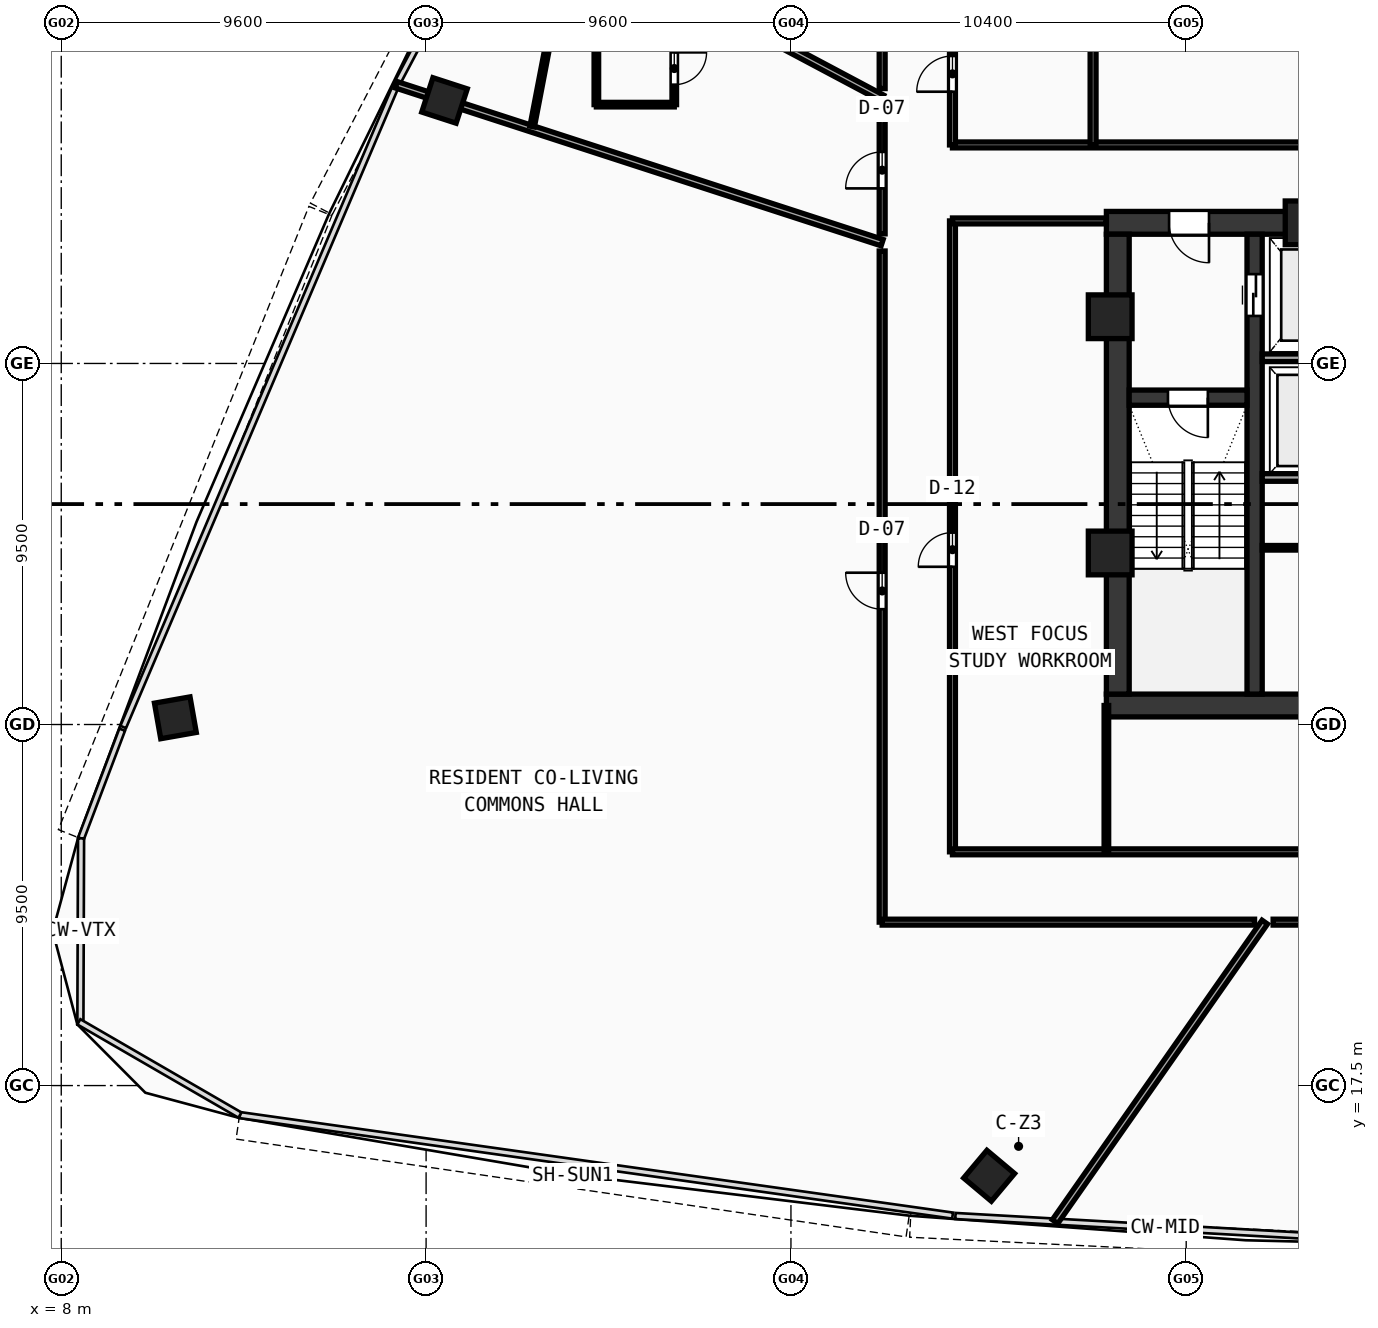
"""IFC4 building model, lengths in metres.
Left out: names, types, materials, properties, quantities, classifications, styles, units other than length and angle.
Written with IfcOpenShell. Run it as: python <this file> out.ifc"""

import sys

from ifc_helpers import new_model, si_unit, direction, frame, frame_2d, origin, origin_with_axes, origin_2d, place, context, subcontext, project, spatial, rectangle, hollow_rectangle, extrude, source, transform, mapped, element, fill, save


model = new_model("IFC4")
c1 = context("Model", 3, precision=1e-05, world=origin(), true_north=direction((0.0, 1.0)))
c2 = subcontext(c1, "Body", "Model", "MODEL_VIEW")
j1 = project(units=[si_unit("LENGTHUNIT", "METRE"), si_unit("PLANEANGLEUNIT", "RADIAN")], contexts=[c1])
p1 = place(None, origin())
s1 = spatial("IfcSite", under=j1, at=p1, CompositionType="ELEMENT")
p2 = place(p1, origin())
s2 = spatial("IfcBuilding", under=s1, at=p2, CompositionType="ELEMENT")
p3 = place(p2, frame((0.0, 0.0, 151.91)))
s3 = spatial("IfcBuildingStorey", under=s2, at=p3, CompositionType="ELEMENT", Elevation=151.91)
p4 = place(p3, frame((35.5, 27.5, 0.0), z_axis=(0.0, 0.0, 1.0), x_axis=(1.0, 0.0, 0.0)))
e1 = element("IfcWall", 1, at=p4, inside=s3, PredefinedType="SHEAR", context=c2, shape_type="SweptSolid", body=[
    extrude(rectangle(XDim=25.0, YDim=0.6, at=frame_2d((12.5, 0.0))), origin(), (0.0, 0.0, 1.0), 3.42),
])
p5 = place(p3, frame((35.5, 40.2, 0.0), z_axis=(0.0, 0.0, 1.0), x_axis=(1.0, 0.0, 0.0)))
e2 = element("IfcWall", 2, at=p5, inside=s3, PredefinedType="SHEAR", context=c2, shape_type="SweptSolid", body=[
    extrude(rectangle(XDim=11.3, YDim=0.6, at=frame_2d((5.65, 0.0))), origin(), (0.0, 0.0, 1.0), 3.42),
])
p6 = place(p5, frame((1.65, 0.0, 0.0)))
e3 = element("IfcOpeningElement", 3, at=p6, cuts=e2, PredefinedType="OPENING", context=c2, shape_type="SweptSolid", body=[
    extrude(rectangle(XDim=1.05, YDim=2.1, at=frame_2d((0.525, 1.05))), frame((0.0, 0.31, 0.0), z_axis=(0.0, -1.0, 0.0), x_axis=(1.0, 0.0, 0.0)), (0.0, 0.0, 1.0), 0.62),
])
p7 = place(p3, frame((35.8, 27.8, 0.0), z_axis=(0.0, 0.0, 1.0), x_axis=(0.0, 1.0, 0.0)))
e4 = element("IfcWall", 4, at=p7, inside=s3, PredefinedType="SHEAR", context=c2, shape_type="SweptSolid", body=[
    extrude(rectangle(XDim=12.1, YDim=0.6, at=frame_2d((6.05, 0.0))), origin(), (0.0, 0.0, 1.0), 3.42),
])
p8 = place(p3, frame((39.4, 27.8, 0.0), z_axis=(0.0, 0.0, 1.0), x_axis=(0.0, 1.0, 0.0)))
e5 = element("IfcWall", 5, at=p8, inside=s3, PredefinedType="SHEAR", context=c2, shape_type="SweptSolid", body=[
    extrude(rectangle(XDim=12.1, YDim=0.4, at=frame_2d((6.05, 0.0))), origin(), (0.0, 0.0, 1.0), 3.42),
])
p9 = place(p8, frame((9.95, 0.0, 0.0)))
e6 = element("IfcOpeningElement", 6, at=p9, cuts=e5, PredefinedType="OPENING", context=c2, shape_type="SweptSolid", body=[
    extrude(rectangle(XDim=1.1, YDim=2.1, at=frame_2d((0.55, 1.05))), frame((0.0, 0.21, 0.0), z_axis=(0.0, -1.0, 0.0), x_axis=(1.0, 0.0, 0.0)), (0.0, 0.0, 1.0), 0.42),
])
p10 = place(p3, frame((36.1, 35.6, 0.0), z_axis=(0.0, 0.0, 1.0), x_axis=(1.0, 0.0, 0.0)))
e7 = element("IfcWall", 7, at=p10, inside=s3, PredefinedType="SHEAR", context=c2, shape_type="SweptSolid", body=[
    extrude(rectangle(XDim=3.1, YDim=0.4, at=frame_2d((1.55, 0.0))), origin(), (0.0, 0.0, 1.0), 3.42),
])
p11 = place(p10, frame((1.02, 0.0, 0.0)))
e8 = element("IfcOpeningElement", 8, at=p11, cuts=e7, PredefinedType="OPENING", context=c2, shape_type="SweptSolid", body=[
    extrude(rectangle(XDim=1.05, YDim=2.1, at=frame_2d((0.525, 1.05))), frame((0.0, 0.21, 0.0), z_axis=(0.0, -1.0, 0.0), x_axis=(1.0, 0.0, 0.0)), (0.0, 0.0, 1.0), 0.42),
])
m1 = source(origin(), c2, "Body", "SweptSolid", [
    extrude(hollow_rectangle(XDim=1.15, YDim=1.15, WallThickness=0.048, at=origin_2d()), origin(), (0.0, 0.0, 1.0), 3.68),
])
for number, where, z_axis, x_axis in (
    (9, (40.781, 40.2, -0.26), (0.0, 0.0, 1.0), (1.0, 0.0, 0.0)),
    (10, (35.6, 37.729, -0.26), (0.0, 0.0, 1.0), (1.0, 0.0, 0.0)),
    (11, (35.6, 31.513, -0.26), (0.0, 0.0, 1.0), (1.0, 0.0, 0.0)),
):
    element("IfcColumn", number, at=place(p3, frame(where, z_axis=z_axis, x_axis=x_axis)), inside=s3, PredefinedType="COLUMN", context=c2, shape_type="MappedRepresentation", body=[
        mapped(m1, transform((0.0, 0.0, 0.0), scale=1.0)),
    ])
m2 = source(origin(), c2, "Body", "SweptSolid", [
    extrude(hollow_rectangle(XDim=0.95, YDim=0.95, WallThickness=0.04, at=origin_2d()), origin(), (0.0, 0.0, 1.0), 3.68),
])
for number, where, z_axis, x_axis in (
    (12, (32.415, 15.126, -0.26), (0.0, 0.0, 1.0), (0.766, -0.643, 0.0)),
    (13, (18.085, 43.42, -0.26), (0.0, 0.0, 1.0), (-0.309, -0.951, 0.0)),
    (14, (11.003, 27.177, -0.26), (0.0, 0.0, 1.0), (0.174, -0.985, 0.0)),
):
    element("IfcColumn", number, at=place(p3, frame(where, z_axis=z_axis, x_axis=x_axis)), inside=s3, PredefinedType="COLUMN", context=c2, shape_type="MappedRepresentation", body=[
        mapped(m2, transform((0.0, 0.0, 0.0), scale=1.0)),
    ])
for number, where, z_axis, x_axis in (
    (15, (39.6, 36.65, 0.0), (0.0, 0.0, 1.0), (1.0, 0.0, 0.0)),
    (16, (39.6, 33.5, 0.0), (0.0, 0.0, 1.0), (1.0, 0.0, 0.0)),
):
    element("IfcWall", number, at=place(p3, frame(where, z_axis=z_axis, x_axis=x_axis)), inside=s3, PredefinedType="SOLIDWALL", context=c2, shape_type="SweptSolid", body=[
        extrude(rectangle(XDim=2.72, YDim=0.2, at=frame_2d((1.36, 0.0))), origin(), (0.0, 0.0, 1.0), 3.42),
    ])
p12 = place(p3, frame((39.6, 31.65, 0.0), z_axis=(0.0, 0.0, 1.0), x_axis=(1.0, 0.0, 0.0)))
e17 = element("IfcWall", 17, at=p12, inside=s3, PredefinedType="PARTITIONING", context=c2, shape_type="SweptSolid", body=[
    extrude(rectangle(XDim=2.72, YDim=0.12, at=frame_2d((1.36, 0.0))), origin(), (0.0, 0.0, 1.0), 3.42),
])
p13 = place(p3, frame((31.45, 42.25, 0.0), z_axis=(0.0, 0.0, 1.0), x_axis=(1.0, 0.0, 0.0)))
e18 = element("IfcWall", 18, at=p13, inside=s3, PredefinedType="PARTITIONING", context=c2, shape_type="SweptSolid", body=[
    extrude(rectangle(XDim=33.1, YDim=0.155, at=frame_2d((16.55, 0.0))), origin(), (0.0, 0.0, 1.0), 2.77),
])
p14 = place(p3, frame((31.45, 42.25, 0.0), z_axis=(0.0, 0.0, 1.0), x_axis=(0.0, 1.0, 0.0)))
e19 = element("IfcWall", 19, at=p14, inside=s3, PredefinedType="PARTITIONING", context=c2, shape_type="SweptSolid", body=[
    extrude(rectangle(XDim=11.7, YDim=0.155, at=frame_2d((5.85, 0.0))), origin(), (0.0, 0.0, 1.0), 2.77),
])
p15 = place(p14, frame((1.4, 0.0, 0.0)))
e20 = element("IfcOpeningElement", 20, at=p15, cuts=e19, PredefinedType="OPENING", context=c2, shape_type="SweptSolid", body=[
    extrude(rectangle(XDim=0.94, YDim=2.1, at=frame_2d((0.47, 1.05))), frame((0.0, 0.087, 0.0), z_axis=(0.0, -1.0, 0.0), x_axis=(1.0, 0.0, 0.0)), (0.0, 0.0, 1.0), 0.175),
])
p16 = place(p14, frame((6.8, 0.0, 0.0)))
e21 = element("IfcOpeningElement", 21, at=p16, cuts=e19, PredefinedType="OPENING", context=c2, shape_type="SweptSolid", body=[
    extrude(rectangle(XDim=0.92, YDim=2.1, at=frame_2d((0.46, 1.05))), frame((0.0, 0.087, 0.0), z_axis=(0.0, -1.0, 0.0), x_axis=(1.0, 0.0, 0.0)), (0.0, 0.0, 1.0), 0.175),
])
p17 = place(p3, frame((35.15, 42.25, 0.0), z_axis=(0.0, 0.0, 1.0), x_axis=(0.0, 1.0, 0.0)))
e22 = element("IfcWall", 22, at=p17, inside=s3, PredefinedType="PARTITIONING", context=c2, shape_type="SweptSolid", body=[
    extrude(rectangle(XDim=11.7, YDim=0.155, at=frame_2d((5.85, 0.0))), origin(), (0.0, 0.0, 1.0), 2.77),
])
p18 = place(p3, frame((31.45, 23.65, 0.0), z_axis=(0.0, 0.0, 1.0), x_axis=(0.0, 1.0, 0.0)))
e23 = element("IfcWall", 23, at=p18, inside=s3, PredefinedType="PARTITIONING", context=c2, shape_type="SweptSolid", body=[
    extrude(rectangle(XDim=16.6, YDim=0.155, at=frame_2d((8.3, 0.0))), origin(), (0.0, 0.0, 1.0), 2.77),
])
p19 = place(p18, frame((7.5, 0.0, 0.0)))
e24 = element("IfcOpeningElement", 24, at=p19, cuts=e23, PredefinedType="OPENING", context=c2, shape_type="SweptSolid", body=[
    extrude(rectangle(XDim=0.9, YDim=2.08, at=frame_2d((0.45, 1.04))), frame((0.0, 0.087, 0.0), z_axis=(0.0, -1.0, 0.0), x_axis=(1.0, 0.0, 0.0)), (0.0, 0.0, 1.0), 0.175),
])
p20 = place(p3, frame((31.45, 23.65, 0.0), z_axis=(0.0, 0.0, 1.0), x_axis=(1.0, 0.0, 0.0)))
e25 = element("IfcWall", 25, at=p20, inside=s3, PredefinedType="PARTITIONING", context=c2, shape_type="SweptSolid", body=[
    extrude(rectangle(XDim=33.1, YDim=0.155, at=frame_2d((16.55, 0.0))), origin(), (0.0, 0.0, 1.0), 2.77),
])
p21 = place(p20, frame((16.0, 0.0, 0.0)))
e26 = element("IfcOpeningElement", 26, at=p21, cuts=e25, PredefinedType="OPENING", context=c2, shape_type="SweptSolid", body=[
    extrude(rectangle(XDim=0.92, YDim=2.1, at=frame_2d((0.46, 1.05))), frame((0.0, 0.087, 0.0), z_axis=(0.0, -1.0, 0.0), x_axis=(1.0, 0.0, 0.0)), (0.0, 0.0, 1.0), 0.175),
])
p22 = place(p3, frame((31.45, 40.25, 0.0), z_axis=(0.0, 0.0, 1.0), x_axis=(1.0, 0.0, 0.0)))
e27 = element("IfcWall", 27, at=p22, inside=s3, PredefinedType="PARTITIONING", context=c2, shape_type="SweptSolid", body=[
    extrude(rectangle(XDim=4.05, YDim=0.155, at=frame_2d((2.025, 0.0))), origin(), (0.0, 0.0, 1.0), 3.42),
])
p23 = place(p3, frame((35.5, 23.65, 0.0), z_axis=(0.0, 0.0, 1.0), x_axis=(0.0, 1.0, 0.0)))
e28 = element("IfcWall", 28, at=p23, inside=s3, PredefinedType="PARTITIONING", context=c2, shape_type="SweptSolid", body=[
    extrude(rectangle(XDim=3.85, YDim=0.12, at=frame_2d((1.925, 0.0))), origin(), (0.0, 0.0, 1.0), 3.02),
])
p24 = place(p3, frame((29.6, 43.483, 0.0), z_axis=(0.0, 0.0, 1.0), x_axis=(-0.882944706502, 0.469476991193, 0.0)))
e29 = element("IfcWall", 29, at=p24, inside=s3, PredefinedType="PARTITIONING", context=c2, shape_type="SweptSolid", body=[
    extrude(rectangle(XDim=11.464, YDim=0.175, at=frame_2d((5.732, 0.0))), origin(), (0.0, 0.0, 1.0), 2.77),
])
p25 = place(p3, frame((29.6, 39.678, 0.0), z_axis=(0.0, 0.0, 1.0), x_axis=(-0.951059027278, 0.309009266259, 0.0)))
e30 = element("IfcWall", 30, at=p25, inside=s3, PredefinedType="PARTITIONING", context=c2, shape_type="SweptSolid", body=[
    extrude(rectangle(XDim=13.441, YDim=0.175, at=frame_2d((6.72, 0.0))), origin(), (0.0, 0.0, 1.0), 2.77),
])
p26 = place(p3, frame((39.667, 21.8, 0.0), z_axis=(0.0, 0.0, 1.0), x_axis=(-0.573578164834, -0.81915083399, 0.0)))
e31 = element("IfcWall", 31, at=p26, inside=s3, PredefinedType="PARTITIONING", context=c2, shape_type="SweptSolid", body=[
    extrude(rectangle(XDim=9.62, YDim=0.175, at=frame_2d((4.81, 0.0))), origin(), (0.0, 0.0, 1.0), 2.77),
])
p27 = place(p3, frame((29.6, 21.8, 0.0), z_axis=(0.0, 0.0, 1.0), x_axis=(0.0, 1.0, 0.0)))
e32 = element("IfcWall", 32, at=p27, inside=s3, PredefinedType="PARTITIONING", context=c2, shape_type="SweptSolid", body=[
    extrude(rectangle(XDim=17.659, YDim=0.155, at=frame_2d((8.829, 0.0))), origin(), (0.0, 0.0, 1.0), 2.77),
])
p28 = place(p27, frame((8.234, 0.0, 0.0)))
e33 = element("IfcOpeningElement", 33, at=p28, cuts=e32, PredefinedType="OPENING", context=c2, shape_type="SweptSolid", body=[
    extrude(rectangle(XDim=0.96, YDim=2.12, at=frame_2d((0.48, 1.06))), frame((0.0, 0.087, 0.0), z_axis=(0.0, -1.0, 0.0), x_axis=(1.0, 0.0, 0.0)), (0.0, 0.0, 1.0), 0.175),
])
p29 = place(p3, frame((29.6, 39.91, 0.0), z_axis=(0.0, 0.0, 1.0), x_axis=(0.0, 1.0, 0.0)))
e34 = element("IfcWall", 34, at=p29, inside=s3, PredefinedType="PARTITIONING", context=c2, shape_type="SweptSolid", body=[
    extrude(rectangle(XDim=3.354, YDim=0.155, at=frame_2d((1.677, 0.0))), origin(), (0.0, 0.0, 1.0), 3.02),
])
p30 = place(p29, frame((1.196, 0.0, 0.0)))
e35 = element("IfcOpeningElement", 35, at=p30, cuts=e34, PredefinedType="OPENING", context=c2, shape_type="SweptSolid", body=[
    extrude(rectangle(XDim=0.96, YDim=2.12, at=frame_2d((0.48, 1.06))), frame((0.0, 0.087, 0.0), z_axis=(0.0, -1.0, 0.0), x_axis=(1.0, 0.0, 0.0)), (0.0, 0.0, 1.0), 0.175),
])
p31 = place(p3, frame((29.6, 43.733, 0.0), z_axis=(0.0, 0.0, 1.0), x_axis=(0.0, 1.0, 0.0)))
e36 = element("IfcWall", 36, at=p31, inside=s3, PredefinedType="PARTITIONING", context=c2, shape_type="SweptSolid", body=[
    extrude(rectangle(XDim=6.315, YDim=0.155, at=frame_2d((3.157, 0.0))), origin(), (0.0, 0.0, 1.0), 2.77),
])
p32 = place(p31, frame((2.683, 0.0, 0.0)))
e37 = element("IfcOpeningElement", 37, at=p32, cuts=e36, PredefinedType="OPENING", context=c2, shape_type="SweptSolid", body=[
    extrude(rectangle(XDim=0.92, YDim=2.1, at=frame_2d((0.46, 1.05))), frame((0.0, 0.087, 0.0), z_axis=(0.0, -1.0, 0.0), x_axis=(1.0, 0.0, 0.0)), (0.0, 0.0, 1.0), 0.175),
])
p33 = place(p3, frame((44.583, 21.8, 0.0), z_axis=(0.0, 0.0, 1.0), x_axis=(-1.0, 0.0, 0.0)))
e38 = element("IfcWall", 38, at=p33, inside=s3, PredefinedType="PARTITIONING", context=c2, shape_type="SweptSolid", body=[
    extrude(rectangle(XDim=4.696, YDim=0.155, at=frame_2d((2.348, 0.0))), origin(), (0.0, 0.0, 1.0), 3.42),
])
p34 = place(p33, frame((1.869, 0.0, 0.0)))
e39 = element("IfcOpeningElement", 39, at=p34, cuts=e38, PredefinedType="OPENING", context=c2, shape_type="SweptSolid", body=[
    extrude(rectangle(XDim=0.96, YDim=2.12, at=frame_2d((0.48, 1.06))), frame((0.0, 0.087, 0.0), z_axis=(0.0, -1.0, 0.0), x_axis=(1.0, 0.0, 0.0)), (0.0, 0.0, 1.0), 0.175),
])
p35 = place(p3, frame((39.399, 21.8, 0.0), z_axis=(0.0, 0.0, 1.0), x_axis=(-1.0, 0.0, 0.0)))
e40 = element("IfcWall", 40, at=p35, inside=s3, PredefinedType="PARTITIONING", context=c2, shape_type="SweptSolid", body=[
    extrude(rectangle(XDim=9.799, YDim=0.155, at=frame_2d((4.899, 0.0))), origin(), (0.0, 0.0, 1.0), 2.77),
])
p36 = place(p3, frame((22.08, 43.31, 0.0), z_axis=(0.0, 0.0, 1.0), x_axis=(1.0, 0.0, 0.0)))
e41 = element("IfcWall", 41, at=p36, inside=s3, PredefinedType="PARTITIONING", context=c2, shape_type="SweptSolid", body=[
    extrude(rectangle(XDim=2.05, YDim=0.12, at=frame_2d((1.025, 0.0))), origin(), (0.0, 0.0, 1.0), 3.42),
])
p37 = place(p3, frame((24.13, 43.31, 0.0), z_axis=(0.0, 0.0, 1.0), x_axis=(0.0, 1.0, 0.0)))
e42 = element("IfcWall", 42, at=p37, inside=s3, PredefinedType="PARTITIONING", context=c2, shape_type="SweptSolid", body=[
    extrude(rectangle(XDim=1.9, YDim=0.12, at=frame_2d((0.95, 0.0))), origin(), (0.0, 0.0, 1.0), 3.42),
])
p38 = place(p37, frame((0.525, 0.0, 0.0)))
e43 = element("IfcOpeningElement", 43, at=p38, cuts=e42, PredefinedType="OPENING", context=c2, shape_type="SweptSolid", body=[
    extrude(rectangle(XDim=0.85, YDim=2.1, at=frame_2d((0.425, 1.05))), frame((0.0, 0.07, 0.0), z_axis=(0.0, -1.0, 0.0), x_axis=(1.0, 0.0, 0.0)), (0.0, 0.0, 1.0), 0.14),
])
p39 = place(p3, frame((22.08, 45.21, 0.0), z_axis=(0.0, 0.0, 1.0), x_axis=(0.0, -1.0, 0.0)))
e44 = element("IfcWall", 44, at=p39, inside=s3, PredefinedType="PARTITIONING", context=c2, shape_type="SweptSolid", body=[
    extrude(rectangle(XDim=1.9, YDim=0.12, at=frame_2d((0.95, 0.0))), origin(), (0.0, 0.0, 1.0), 3.42),
])
p40 = place(p3, frame((21.364, 47.795, 0.0), z_axis=(0.0, 0.0, 1.0), x_axis=(-0.188731428073, -0.982028740953, 0.0)))
e45 = element("IfcWall", 45, at=p40, inside=s3, PredefinedType="PARTITIONING", context=c2, shape_type="SweptSolid", body=[
    extrude(rectangle(XDim=5.154, YDim=0.12, at=frame_2d((2.577, 0.0))), origin(), (0.0, 0.0, 1.0), 2.77),
])
p41 = place(p40, frame((2.117, 0.0, 0.0)))
e46 = element("IfcOpeningElement", 46, at=p41, cuts=e45, PredefinedType="OPENING", context=c2, shape_type="SweptSolid", body=[
    extrude(rectangle(XDim=0.92, YDim=2.1, at=frame_2d((0.46, 1.05))), frame((0.0, 0.07, 0.0), z_axis=(0.0, -1.0, 0.0), x_axis=(1.0, 0.0, 0.0)), (0.0, 0.0, 1.0), 0.14),
])
m3 = source(origin(), c2, "Body", "SweptSolid", [
    extrude(rectangle(XDim=1.05, YDim=2.1, at=frame_2d((0.525, 1.05))), frame((0.0, 0.025, 0.0), z_axis=(0.0, -1.0, 0.0), x_axis=(1.0, 0.0, 0.0)), (0.0, 0.0, 1.0), 0.05),
])
p42 = place(p11, frame((1.05, 0.0, 0.0), z_axis=(0.0, 0.0, 1.0), x_axis=(-1.0, 0.0, 0.0)))
e47 = element("IfcDoor", 47, at=p42, inside=s3, OperationType="SINGLE_SWING_LEFT", PredefinedType="DOOR", context=c2, shape_type="MappedRepresentation", body=[
    mapped(m3, transform((0.0, 0.0, 0.0), scale=1.0)),
])
fill(e8, e47)
p43 = place(p6, frame((1.05, 0.0, 0.0), z_axis=(0.0, 0.0, 1.0), x_axis=(-1.0, 0.0, 0.0)))
e48 = element("IfcDoor", 48, at=p43, inside=s3, OperationType="SINGLE_SWING_LEFT", PredefinedType="DOOR", context=c2, shape_type="MappedRepresentation", body=[
    mapped(m3, transform((0.0, 0.0, 0.0), scale=1.0)),
])
fill(e3, e48)
m4 = source(origin(), c2, "Body", "SweptSolid", [
    extrude(rectangle(XDim=1.1, YDim=2.1, at=frame_2d((0.55, 1.05))), frame((0.0, 0.025, 0.0), z_axis=(0.0, -1.0, 0.0), x_axis=(1.0, 0.0, 0.0)), (0.0, 0.0, 1.0), 0.05),
])
p44 = place(p9, frame((1.1, 0.0, 0.0), z_axis=(0.0, 0.0, 1.0), x_axis=(-1.0, 0.0, 0.0)))
e49 = element("IfcDoor", 49, at=p44, inside=s3, OperationType="DOUBLE_DOOR_SLIDING", PredefinedType="DOOR", context=c2, shape_type="MappedRepresentation", body=[
    mapped(m4, transform((0.0, 0.0, 0.0), scale=1.0)),
])
fill(e6, e49)
m5 = source(origin(), c2, "Body", "SweptSolid", [
    extrude(rectangle(XDim=0.94, YDim=2.1, at=frame_2d((0.47, 1.05))), frame((0.0, 0.025, 0.0), z_axis=(0.0, -1.0, 0.0), x_axis=(1.0, 0.0, 0.0)), (0.0, 0.0, 1.0), 0.05),
])
p45 = place(p15, origin_with_axes())
e50 = element("IfcDoor", 50, at=p45, inside=s3, OperationType="SINGLE_SWING_LEFT", PredefinedType="DOOR", context=c2, shape_type="MappedRepresentation", body=[
    mapped(m5, transform((0.0, 0.0, 0.0), scale=1.0)),
])
fill(e20, e50)
m6 = source(origin(), c2, "Body", "SweptSolid", [
    extrude(rectangle(XDim=0.9, YDim=2.08, at=frame_2d((0.45, 1.04))), frame((0.0, 0.025, 0.0), z_axis=(0.0, -1.0, 0.0), x_axis=(1.0, 0.0, 0.0)), (0.0, 0.0, 1.0), 0.05),
])
p46 = place(p19, origin_with_axes())
e51 = element("IfcDoor", 51, at=p46, inside=s3, OperationType="SINGLE_SWING_LEFT", PredefinedType="DOOR", context=c2, shape_type="MappedRepresentation", body=[
    mapped(m6, transform((0.0, 0.0, 0.0), scale=1.0)),
])
fill(e24, e51)
m7 = source(origin(), c2, "Body", "SweptSolid", [
    extrude(rectangle(XDim=0.96, YDim=2.12, at=frame_2d((0.48, 1.06))), frame((0.0, 0.025, 0.0), z_axis=(0.0, -1.0, 0.0), x_axis=(1.0, 0.0, 0.0)), (0.0, 0.0, 1.0), 0.05),
])
p47 = place(p30, origin_with_axes())
e52 = element("IfcDoor", 52, at=p47, inside=s3, OperationType="SINGLE_SWING_LEFT", PredefinedType="DOOR", context=c2, shape_type="MappedRepresentation", body=[
    mapped(m7, transform((0.0, 0.0, 0.0), scale=1.0)),
])
fill(e35, e52)
m8 = source(origin(), c2, "Body", "SweptSolid", [
    extrude(rectangle(XDim=0.85, YDim=2.1, at=frame_2d((0.425, 1.05))), frame((0.0, 0.025, 0.0), z_axis=(0.0, -1.0, 0.0), x_axis=(1.0, 0.0, 0.0)), (0.0, 0.0, 1.0), 0.05),
])
p48 = place(p38, frame((0.85, 0.0, 0.0), z_axis=(0.0, 0.0, 1.0), x_axis=(-1.0, 0.0, 0.0)))
e53 = element("IfcDoor", 53, at=p48, inside=s3, OperationType="SINGLE_SWING_LEFT", PredefinedType="DOOR", context=c2, shape_type="MappedRepresentation", body=[
    mapped(m8, transform((0.0, 0.0, 0.0), scale=1.0)),
])
fill(e43, e53)
p49 = place(p28, origin_with_axes())
e54 = element("IfcDoor", 54, at=p49, inside=s3, OperationType="SINGLE_SWING_RIGHT", PredefinedType="DOOR", context=c2, shape_type="MappedRepresentation", body=[
    mapped(m7, transform((0.0, 0.0, 0.0), scale=1.0)),
])
fill(e33, e54)
save(model, sys.argv[1])
